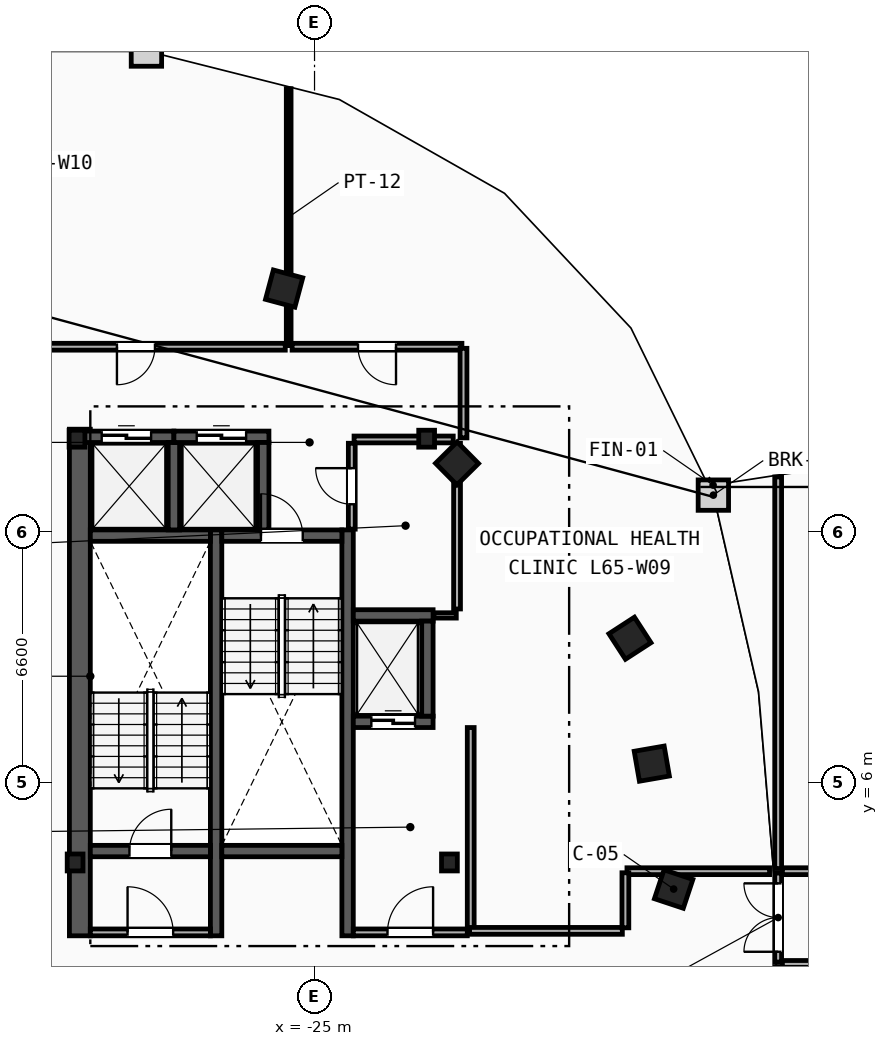
"""IFC4 building model, lengths in metres.
Left out: names, types, materials, properties, quantities, classifications, styles, units other than length and angle.
Written with IfcOpenShell. Run it as: python <this file> out.ifc"""

import sys

from ifc_helpers import new_model, si_unit, direction, frame, frame_2d, origin, origin_2d, place, context, subcontext, project, spatial, rectangle, i_section, extrude, element, fill, save


model = new_model("IFC4")
c1 = context("Model", 3, precision=1e-05, world=origin(), true_north=direction((0.0, 1.0)))
c2 = subcontext(c1, "Body", "Model", "MODEL_VIEW")
j1 = project(units=[si_unit("LENGTHUNIT", "METRE"), si_unit("PLANEANGLEUNIT", "RADIAN")], contexts=[c1])
p1 = place(None, origin())
s1 = spatial("IfcSite", under=j1, at=p1, CompositionType="ELEMENT")
p2 = place(p1, origin())
s2 = spatial("IfcBuilding", under=s1, at=p2, CompositionType="ELEMENT")
p3 = place(p2, frame((0.0, 0.0, 246.8)))
s3 = spatial("IfcBuildingStorey", under=s2, at=p3, CompositionType="ELEMENT", Elevation=246.8)
for number, where, z_axis, x_axis in (
    (1, (-31.3, 3.9, 0.0), (0.0, 0.0, 1.0), (1.0, 0.0, 0.0)),
    (2, (-21.45, 3.9, 0.0), (0.0, 0.0, 1.0), (1.0, 0.0, 0.0)),
    (3, (-22.05, 15.05, 0.0), (0.0, 0.0, 1.0), (1.0, 0.0, 0.0)),
    (4, (-31.25, 15.05, 0.0), (0.0, 0.0, 1.0), (1.0, 0.0, 0.0)),
):
    element("IfcColumn", number, at=place(p3, frame(where, z_axis=z_axis, x_axis=x_axis)), inside=s3, PredefinedType="COLUMN", context=c2, shape_type="SweptSolid", body=[
        extrude(i_section(OverallWidth=0.416, OverallDepth=0.446, WebThickness=0.039, FlangeThickness=0.063, FilletRadius=0.018, at=origin_2d()), origin(), (0.0, 0.0, 1.0), 3.6),
    ])
for number, where, z_axis, x_axis in (
    (5, (-15.55, 3.2, 0.0), (0.0, 0.0, 1.0), (0.315, 0.949, 0.0)),
    (6, (-16.125, 6.5, 0.0), (0.0, 0.0, 1.0), (-0.172, 0.985, 0.0)),
    (7, (-16.7, 9.8, 0.0), (0.0, 0.0, 1.0), (-0.544, 0.839, 0.0)),
    (8, (-21.25, 14.4, 0.0), (0.0, 0.0, 1.0), (-0.703, 0.711, 0.0)),
    (9, (-25.8, 19.0, 0.0), (0.0, 0.0, 1.0), (-0.966, 0.259, 0.0)),
):
    element("IfcColumn", number, at=place(p3, frame(where, z_axis=z_axis, x_axis=x_axis)), inside=s3, PredefinedType="COLUMN", context=c2, shape_type="SweptSolid", body=[
        extrude(rectangle(XDim=0.8, YDim=0.8, at=origin_2d()), origin(), (0.0, 0.0, 1.0), 3.6),
    ])
p4 = place(p3, frame((-31.175, 1.97, 0.0), z_axis=(0.0, 0.0, 1.0), x_axis=(0.0, 1.0, 0.0)))
e10 = element("IfcWall", 10, at=p4, inside=s3, PredefinedType="SHEAR", context=c2, shape_type="SweptSolid", body=[
    extrude(rectangle(XDim=13.33, YDim=0.55, at=frame_2d((6.665, 0.0))), origin(), (0.0, 0.0, 1.0), 3.34),
])
for number, where, z_axis, x_axis in (
    (11, (-27.59, 1.97, 0.0), (0.0, 0.0, 1.0), (0.0, 1.0, 0.0)),
    (12, (-24.13, 1.97, 0.0), (0.0, 0.0, 1.0), (0.0, 1.0, 0.0)),
):
    element("IfcWall", number, at=place(p3, frame(where, z_axis=z_axis, x_axis=x_axis)), inside=s3, PredefinedType="SHEAR", context=c2, shape_type="SweptSolid", body=[
        extrude(rectangle(XDim=10.68, YDim=0.3, at=frame_2d((5.34, 0.0))), origin(), (0.0, 0.0, 1.0), 3.34),
    ])
p5 = place(p3, frame((-30.9, 4.2, 0.0), z_axis=(0.0, 0.0, 1.0), x_axis=(1.0, 0.0, 0.0)))
e13 = element("IfcWall", 13, at=p5, inside=s3, PredefinedType="SHEAR", context=c2, shape_type="SweptSolid", body=[
    extrude(rectangle(XDim=3.16, YDim=0.3, at=frame_2d((1.58, 0.0))), origin(), (0.0, 0.0, 1.0), 3.34),
])
p6 = place(p5, frame((1.03, 0.0, 0.0)))
e14 = element("IfcOpeningElement", 14, at=p6, cuts=e13, PredefinedType="OPENING", context=c2, shape_type="SweptSolid", body=[
    extrude(rectangle(XDim=1.1, YDim=2.15, at=frame_2d((0.55, 1.075))), frame((0.0, 0.16, 0.0), z_axis=(0.0, -1.0, 0.0), x_axis=(1.0, 0.0, 0.0)), (0.0, 0.0, 1.0), 0.32),
])
p7 = place(p3, frame((-30.9, 12.5, 0.0), z_axis=(0.0, 0.0, 1.0), x_axis=(1.0, 0.0, 0.0)))
e15 = element("IfcWall", 15, at=p7, inside=s3, PredefinedType="SHEAR", context=c2, shape_type="SweptSolid", body=[
    extrude(rectangle(XDim=3.16, YDim=0.3, at=frame_2d((1.58, 0.0))), origin(), (0.0, 0.0, 1.0), 3.34),
])
p8 = place(p3, frame((-27.44, 12.5, 0.0), z_axis=(0.0, 0.0, 1.0), x_axis=(1.0, 0.0, 0.0)))
e16 = element("IfcWall", 16, at=p8, inside=s3, PredefinedType="SHEAR", context=c2, shape_type="SweptSolid", body=[
    extrude(rectangle(XDim=3.16, YDim=0.3, at=frame_2d((1.58, 0.0))), origin(), (0.0, 0.0, 1.0), 3.34),
])
p9 = place(p8, frame((1.03, 0.0, 0.0)))
e17 = element("IfcOpeningElement", 17, at=p9, cuts=e16, PredefinedType="OPENING", context=c2, shape_type="SweptSolid", body=[
    extrude(rectangle(XDim=1.1, YDim=2.15, at=frame_2d((0.55, 1.075))), frame((0.0, 0.16, 0.0), z_axis=(0.0, -1.0, 0.0), x_axis=(1.0, 0.0, 0.0)), (0.0, 0.0, 1.0), 0.32),
])
p10 = place(p3, frame((-27.44, 4.2, 0.0), z_axis=(0.0, 0.0, 1.0), x_axis=(1.0, 0.0, 0.0)))
e18 = element("IfcWall", 18, at=p10, inside=s3, PredefinedType="SHEAR", context=c2, shape_type="SweptSolid", body=[
    extrude(rectangle(XDim=3.16, YDim=0.3, at=frame_2d((1.58, 0.0))), origin(), (0.0, 0.0, 1.0), 3.34),
])
p11 = place(p3, frame((-20.89, 2.15, 0.0), z_axis=(0.0, 0.0, 1.0), x_axis=(0.0, 1.0, 0.0)))
e19 = element("IfcWall", 19, at=p11, inside=s3, PredefinedType="PARTITIONING", context=c2, shape_type="SweptSolid", body=[
    extrude(rectangle(XDim=5.3, YDim=0.18, at=frame_2d((2.65, 0.0))), origin(), (0.0, 0.0, 1.0), 3.34),
])
p12 = place(p3, frame((-23.98, 2.06, 0.0), z_axis=(0.0, 0.0, 1.0), x_axis=(1.0, 0.0, 0.0)))
e20 = element("IfcWall", 20, at=p12, inside=s3, PredefinedType="PARTITIONING", context=c2, shape_type="SweptSolid", body=[
    extrude(rectangle(XDim=3.0, YDim=0.18, at=frame_2d((1.5, 0.0))), origin(), (0.0, 0.0, 1.0), 3.34),
])
p13 = place(p12, frame((0.9, 0.0, 0.0)))
e21 = element("IfcOpeningElement", 21, at=p13, cuts=e20, PredefinedType="OPENING", context=c2, shape_type="SweptSolid", body=[
    extrude(rectangle(XDim=1.2, YDim=2.15, at=frame_2d((0.6, 1.075))), frame((0.0, 0.1, 0.0), z_axis=(0.0, -1.0, 0.0), x_axis=(1.0, 0.0, 0.0)), (0.0, 0.0, 1.0), 0.2),
])
p14 = place(p3, frame((-30.9, 2.06, 0.0), z_axis=(0.0, 0.0, 1.0), x_axis=(1.0, 0.0, 0.0)))
e22 = element("IfcWall", 22, at=p14, inside=s3, PredefinedType="PARTITIONING", context=c2, shape_type="SweptSolid", body=[
    extrude(rectangle(XDim=3.16, YDim=0.18, at=frame_2d((1.58, 0.0))), origin(), (0.0, 0.0, 1.0), 3.34),
])
p15 = place(p14, frame((0.98, 0.0, 0.0)))
e23 = element("IfcOpeningElement", 23, at=p15, cuts=e22, PredefinedType="OPENING", context=c2, shape_type="SweptSolid", body=[
    extrude(rectangle(XDim=1.2, YDim=2.15, at=frame_2d((0.6, 1.075))), frame((0.0, 0.1, 0.0), z_axis=(0.0, -1.0, 0.0), x_axis=(1.0, 0.0, 0.0)), (0.0, 0.0, 1.0), 0.2),
])
p16 = place(p3, frame((-23.98, 7.6, 0.0), z_axis=(0.0, 0.0, 1.0), x_axis=(1.0, 0.0, 0.0)))
e24 = element("IfcWall", 24, at=p16, inside=s3, PredefinedType="SHEAR", context=c2, shape_type="SweptSolid", body=[
    extrude(rectangle(XDim=2.1, YDim=0.3, at=frame_2d((1.05, 0.0))), origin(), (0.0, 0.0, 1.0), 3.34),
])
p17 = place(p16, frame((0.475, 0.0, 0.0)))
e25 = element("IfcOpeningElement", 25, at=p17, cuts=e24, PredefinedType="OPENING", context=c2, shape_type="SweptSolid", body=[
    extrude(rectangle(XDim=1.15, YDim=2.2, at=frame_2d((0.575, 1.1))), frame((0.0, 0.16, 0.0), z_axis=(0.0, -1.0, 0.0), x_axis=(1.0, 0.0, 0.0)), (0.0, 0.0, 1.0), 0.32),
])
p18 = place(p3, frame((-23.98, 10.4, 0.0), z_axis=(0.0, 0.0, 1.0), x_axis=(1.0, 0.0, 0.0)))
e26 = element("IfcWall", 26, at=p18, inside=s3, PredefinedType="SHEAR", context=c2, shape_type="SweptSolid", body=[
    extrude(rectangle(XDim=2.1, YDim=0.3, at=frame_2d((1.05, 0.0))), origin(), (0.0, 0.0, 1.0), 3.34),
])
p19 = place(p3, frame((-22.03, 7.75, 0.0), z_axis=(0.0, 0.0, 1.0), x_axis=(0.0, 1.0, 0.0)))
e27 = element("IfcWall", 27, at=p19, inside=s3, PredefinedType="SHEAR", context=c2, shape_type="SweptSolid", body=[
    extrude(rectangle(XDim=2.5, YDim=0.3, at=frame_2d((1.25, 0.0))), origin(), (0.0, 0.0, 1.0), 3.34),
])
p20 = place(p3, frame((-31.2, 15.1, 0.0), z_axis=(0.0, 0.0, 1.0), x_axis=(1.0, 0.0, 0.0)))
e28 = element("IfcWall", 28, at=p20, inside=s3, PredefinedType="SHEAR", context=c2, shape_type="SweptSolid", body=[
    extrude(rectangle(XDim=2.5, YDim=0.3, at=frame_2d((1.25, 0.0))), origin(), (0.0, 0.0, 1.0), 3.34),
])
p21 = place(p20, frame((0.6, 0.0, 0.0)))
e29 = element("IfcOpeningElement", 29, at=p21, cuts=e28, PredefinedType="OPENING", context=c2, shape_type="SweptSolid", body=[
    extrude(rectangle(XDim=1.3, YDim=2.2, at=frame_2d((0.65, 1.1))), frame((0.0, 0.16, 0.0), z_axis=(0.0, -1.0, 0.0), x_axis=(1.0, 0.0, 0.0)), (0.0, 0.0, 1.0), 0.32),
])
p22 = place(p3, frame((-28.7, 12.65, 0.0), z_axis=(0.0, 0.0, 1.0), x_axis=(0.0, 1.0, 0.0)))
e30 = element("IfcWall", 30, at=p22, inside=s3, PredefinedType="SHEAR", context=c2, shape_type="SweptSolid", body=[
    extrude(rectangle(XDim=2.3, YDim=0.3, at=frame_2d((1.15, 0.0))), origin(), (0.0, 0.0, 1.0), 3.34),
])
p23 = place(p3, frame((-28.7, 15.1, 0.0), z_axis=(0.0, 0.0, 1.0), x_axis=(1.0, 0.0, 0.0)))
e31 = element("IfcWall", 31, at=p23, inside=s3, PredefinedType="SHEAR", context=c2, shape_type="SweptSolid", body=[
    extrude(rectangle(XDim=2.5, YDim=0.3, at=frame_2d((1.25, 0.0))), origin(), (0.0, 0.0, 1.0), 3.34),
])
p24 = place(p23, frame((0.6, 0.0, 0.0)))
e32 = element("IfcOpeningElement", 32, at=p24, cuts=e31, PredefinedType="OPENING", context=c2, shape_type="SweptSolid", body=[
    extrude(rectangle(XDim=1.3, YDim=2.2, at=frame_2d((0.65, 1.1))), frame((0.0, 0.16, 0.0), z_axis=(0.0, -1.0, 0.0), x_axis=(1.0, 0.0, 0.0)), (0.0, 0.0, 1.0), 0.32),
])
p25 = place(p3, frame((-26.35, 12.65, 0.0), z_axis=(0.0, 0.0, 1.0), x_axis=(0.0, 1.0, 0.0)))
e33 = element("IfcWall", 33, at=p25, inside=s3, PredefinedType="SHEAR", context=c2, shape_type="SweptSolid", body=[
    extrude(rectangle(XDim=2.3, YDim=0.3, at=frame_2d((1.15, 0.0))), origin(), (0.0, 0.0, 1.0), 3.34),
])
p26 = place(p3, frame((-21.86, 10.4, 0.0), z_axis=(0.0, 0.0, 1.0), x_axis=(1.0, 0.0, 0.0)))
e34 = element("IfcWall", 34, at=p26, inside=s3, PredefinedType="PARTITIONING", context=c2, shape_type="SweptSolid", body=[
    extrude(rectangle(XDim=0.59, YDim=0.14, at=frame_2d((0.295, 0.0))), origin(), (0.0, 0.0, 1.0), 3.34),
])
p27 = place(p3, frame((-21.25, 10.57, 0.0), z_axis=(0.0, 0.0, 1.0), x_axis=(0.0, 1.0, 0.0)))
e35 = element("IfcWall", 35, at=p27, inside=s3, PredefinedType="PARTITIONING", context=c2, shape_type="SweptSolid", body=[
    extrude(rectangle(XDim=4.36, YDim=0.18, at=frame_2d((2.18, 0.0))), origin(), (0.0, 0.0, 1.0), 3.34),
])
p28 = place(p3, frame((-23.96, 15.03, 0.0), z_axis=(0.0, 0.0, 1.0), x_axis=(1.0, 0.0, 0.0)))
e36 = element("IfcWall", 36, at=p28, inside=s3, PredefinedType="PARTITIONING", context=c2, shape_type="SweptSolid", body=[
    extrude(rectangle(XDim=2.61, YDim=0.18, at=frame_2d((1.305, 0.0))), origin(), (0.0, 0.0, 1.0), 2.413),
])
p29 = place(p3, frame((-24.02, 12.67, 0.0), z_axis=(0.0, 0.0, 1.0), x_axis=(0.0, 1.0, 0.0)))
e37 = element("IfcWall", 37, at=p29, inside=s3, PredefinedType="PARTITIONING", context=c2, shape_type="SweptSolid", body=[
    extrude(rectangle(XDim=2.26, YDim=0.18, at=frame_2d((1.13, 0.0))), origin(), (0.0, 0.0, 1.0), 3.34),
])
p30 = place(p29, frame((0.655, 0.0, 0.0)))
e38 = element("IfcOpeningElement", 38, at=p30, cuts=e37, PredefinedType="OPENING", context=c2, shape_type="SweptSolid", body=[
    extrude(rectangle(XDim=0.95, YDim=2.1, at=frame_2d((0.475, 1.05))), frame((0.0, 0.1, 0.0), z_axis=(0.0, -1.0, 0.0), x_axis=(1.0, 0.0, 0.0)), (0.0, 0.0, 1.0), 0.2),
])
p31 = place(p3, frame((-25.68, 17.5, 0.0), z_axis=(0.0, 0.0, 1.0), x_axis=(0.0, 1.0, 0.0)))
e39 = element("IfcWall", 39, at=p31, inside=s3, PredefinedType="PARTITIONING", context=c2, shape_type="SweptSolid", body=[
    extrude(rectangle(XDim=6.76, YDim=0.125, at=frame_2d((3.38, 0.0))), origin(), (0.0, 0.0, 1.0), 3.34),
])
p32 = place(p3, frame((-21.122, 17.47, 0.0), z_axis=(0.0, 0.0, 1.0), x_axis=(-1.0, 0.0, 0.0)))
e40 = element("IfcWall", 40, at=p32, inside=s3, PredefinedType="PARTITIONING", context=c2, shape_type="SweptSolid", body=[
    extrude(rectangle(XDim=4.469, YDim=0.18, at=frame_2d((2.234, 0.0))), origin(), (0.0, 0.0, 1.0), 3.34),
])
p33 = place(p32, frame((1.734, 0.0, 0.0)))
e41 = element("IfcOpeningElement", 41, at=p33, cuts=e40, PredefinedType="OPENING", context=c2, shape_type="SweptSolid", body=[
    extrude(rectangle(XDim=1.0, YDim=2.15, at=frame_2d((0.5, 1.075))), frame((0.0, 0.1, 0.0), z_axis=(0.0, -1.0, 0.0), x_axis=(1.0, 0.0, 0.0)), (0.0, 0.0, 1.0), 0.2),
])
p34 = place(p3, frame((-16.9, 2.1, 0.0), z_axis=(0.0, 0.0, 1.0), x_axis=(-1.0, 0.0, 0.0)))
e42 = element("IfcWall", 42, at=p34, inside=s3, PredefinedType="PARTITIONING", context=c2, shape_type="SweptSolid", body=[
    extrude(rectangle(XDim=4.02, YDim=0.18, at=frame_2d((2.01, 0.0))), origin(), (0.0, 0.0, 1.0), 3.34),
])
p35 = place(p3, frame((-13.026, 3.67, 0.0), z_axis=(0.0, 0.0, 1.0), x_axis=(-1.0, 0.0, 0.0)))
e43 = element("IfcWall", 43, at=p35, inside=s3, PredefinedType="PARTITIONING", context=c2, shape_type="SweptSolid", body=[
    extrude(rectangle(XDim=3.753, YDim=0.18, at=frame_2d((1.876, 0.0))), origin(), (0.0, 0.0, 1.0), 3.34),
])
p36 = place(p3, frame((-21.08, 15.072, 0.0), z_axis=(0.0, 0.0, 1.0), x_axis=(0.0, 1.0, 0.0)))
e44 = element("IfcWall", 44, at=p36, inside=s3, PredefinedType="PARTITIONING", context=c2, shape_type="SweptSolid", body=[
    extrude(rectangle(XDim=2.357, YDim=0.18, at=frame_2d((1.178, 0.0))), origin(), (0.0, 0.0, 1.0), 3.34),
])
p37 = place(p3, frame((-16.82, 3.628, 0.0), z_axis=(0.0, 0.0, 1.0), x_axis=(0.0, -1.0, 0.0)))
e45 = element("IfcWall", 45, at=p37, inside=s3, PredefinedType="PARTITIONING", context=c2, shape_type="SweptSolid", body=[
    extrude(rectangle(XDim=1.448, YDim=0.18, at=frame_2d((0.724, 0.0))), origin(), (0.0, 0.0, 1.0), 3.34),
])
p38 = place(p3, frame((-25.77, 17.47, 0.0), z_axis=(0.0, 0.0, 1.0), x_axis=(-1.0, 0.0, 0.0)))
e46 = element("IfcWall", 46, at=p38, inside=s3, PredefinedType="PARTITIONING", context=c2, shape_type="SweptSolid", body=[
    extrude(rectangle(XDim=7.858, YDim=0.18, at=frame_2d((3.929, 0.0))), origin(), (0.0, 0.0, 1.0), 3.34),
])
p39 = place(p38, frame((3.429, 0.0, 0.0)))
e47 = element("IfcOpeningElement", 47, at=p39, cuts=e46, PredefinedType="OPENING", context=c2, shape_type="SweptSolid", body=[
    extrude(rectangle(XDim=1.0, YDim=2.15, at=frame_2d((0.5, 1.075))), frame((0.0, 0.1, 0.0), z_axis=(0.0, -1.0, 0.0), x_axis=(1.0, 0.0, 0.0)), (0.0, 0.0, 1.0), 0.2),
])
p40 = place(p3, frame((-12.688, 1.23, 0.0), z_axis=(0.0, 0.0, 1.0), x_axis=(1.0, 0.0, 0.0)))
e48 = element("IfcWall", 48, at=p40, inside=s3, PredefinedType="PARTITIONING", context=c2, shape_type="SweptSolid", body=[
    extrude(rectangle(XDim=12.594, YDim=0.18, at=frame_2d((6.297, 0.0))), origin(), (0.0, 0.0, 1.0), 2.663),
])
p41 = place(p40, frame((5.497, 0.0, 0.0)))
e49 = element("IfcOpeningElement", 49, at=p41, cuts=e48, PredefinedType="OPENING", context=c2, shape_type="SweptSolid", body=[
    extrude(rectangle(XDim=1.6, YDim=2.2, at=frame_2d((0.8, 1.1))), frame((0.0, 0.1, 0.0), z_axis=(0.0, -1.0, 0.0), x_axis=(1.0, 0.0, 0.0)), (0.0, 0.0, 1.0), 0.2),
])
p42 = place(p3, frame((-0.095, 3.67, 0.0), z_axis=(0.0, 0.0, 1.0), x_axis=(-1.0, 0.0, 0.0)))
e50 = element("IfcWall", 50, at=p42, inside=s3, PredefinedType="PARTITIONING", context=c2, shape_type="SweptSolid", body=[
    extrude(rectangle(XDim=12.594, YDim=0.18, at=frame_2d((6.297, 0.0))), origin(), (0.0, 0.0, 1.0), 3.34),
])
p43 = place(p42, frame((5.497, 0.0, 0.0)))
e51 = element("IfcOpeningElement", 51, at=p43, cuts=e50, PredefinedType="OPENING", context=c2, shape_type="SweptSolid", body=[
    extrude(rectangle(XDim=1.6, YDim=2.2, at=frame_2d((0.8, 1.1))), frame((0.0, 0.1, 0.0), z_axis=(0.0, -1.0, 0.0), x_axis=(1.0, 0.0, 0.0)), (0.0, 0.0, 1.0), 0.2),
])
p44 = place(p3, frame((-12.8, -0.285, 0.0), z_axis=(0.0, 0.0, 1.0), x_axis=(0.0, 1.0, 0.0)))
e52 = element("IfcWall", 52, at=p44, inside=s3, PredefinedType="PARTITIONING", context=c2, shape_type="SweptSolid", body=[
    extrude(rectangle(XDim=1.445, YDim=0.18, at=frame_2d((0.722, 0.0))), origin(), (0.0, 0.0, 1.0), 3.34),
])
p45 = place(p3, frame((-12.8, 3.74, 0.0), z_axis=(0.0, 0.0, 1.0), x_axis=(0.0, 1.0, 0.0)))
e53 = element("IfcWall", 53, at=p45, inside=s3, PredefinedType="PARTITIONING", context=c2, shape_type="SweptSolid", body=[
    extrude(rectangle(XDim=10.304, YDim=0.18, at=frame_2d((5.152, 0.0))), origin(), (0.0, 0.0, 1.0), 3.34),
])
p46 = place(p3, frame((-12.8, 1.28, 0.0), z_axis=(0.0, 0.0, 1.0), x_axis=(0.0, 1.0, 0.0)))
e54 = element("IfcWall", 54, at=p46, inside=s3, PredefinedType="PARTITIONING", context=c2, shape_type="SweptSolid", body=[
    extrude(rectangle(XDim=2.34, YDim=0.18, at=frame_2d((1.17, 0.0))), origin(), (0.0, 0.0, 1.0), 3.34),
])
p47 = place(p46, frame((0.27, 0.0, 0.0)))
e55 = element("IfcOpeningElement", 55, at=p47, cuts=e54, PredefinedType="OPENING", context=c2, shape_type="SweptSolid", body=[
    extrude(rectangle(XDim=1.8, YDim=2.25, at=frame_2d((0.9, 1.125))), frame((0.0, 0.1, 0.0), z_axis=(0.0, -1.0, 0.0), x_axis=(1.0, 0.0, 0.0)), (0.0, 0.0, 1.0), 0.2),
])
p48 = place(p6, origin())
e56 = element("IfcDoor", 56, at=p48, inside=s3, OperationType="SINGLE_SWING_RIGHT", PredefinedType="DOOR", context=c2, shape_type="SweptSolid", body=[
    extrude(rectangle(XDim=1.1, YDim=2.15, at=frame_2d((0.55, 1.075))), frame((0.0, 0.025, 0.0), z_axis=(0.0, -1.0, 0.0), x_axis=(1.0, 0.0, 0.0)), (0.0, 0.0, 1.0), 0.05),
])
fill(e14, e56)
p49 = place(p9, origin())
e57 = element("IfcDoor", 57, at=p49, inside=s3, OperationType="SINGLE_SWING_LEFT", PredefinedType="DOOR", context=c2, shape_type="SweptSolid", body=[
    extrude(rectangle(XDim=1.1, YDim=2.15, at=frame_2d((0.55, 1.075))), frame((0.0, 0.025, 0.0), z_axis=(0.0, -1.0, 0.0), x_axis=(1.0, 0.0, 0.0)), (0.0, 0.0, 1.0), 0.05),
])
fill(e17, e57)
p50 = place(p13, origin())
e58 = element("IfcDoor", 58, at=p50, inside=s3, OperationType="SINGLE_SWING_RIGHT", PredefinedType="DOOR", context=c2, shape_type="SweptSolid", body=[
    extrude(rectangle(XDim=1.2, YDim=2.15, at=frame_2d((0.6, 1.075))), frame((0.0, 0.025, 0.0), z_axis=(0.0, -1.0, 0.0), x_axis=(1.0, 0.0, 0.0)), (0.0, 0.0, 1.0), 0.05),
])
fill(e21, e58)
p51 = place(p15, origin())
e59 = element("IfcDoor", 59, at=p51, inside=s3, OperationType="SINGLE_SWING_LEFT", PredefinedType="DOOR", context=c2, shape_type="SweptSolid", body=[
    extrude(rectangle(XDim=1.2, YDim=2.15, at=frame_2d((0.6, 1.075))), frame((0.0, 0.025, 0.0), z_axis=(0.0, -1.0, 0.0), x_axis=(1.0, 0.0, 0.0)), (0.0, 0.0, 1.0), 0.05),
])
fill(e23, e59)
p52 = place(p17, origin())
e60 = element("IfcDoor", 60, at=p52, inside=s3, OperationType="SLIDING_TO_LEFT", PredefinedType="TRAPDOOR", context=c2, shape_type="SweptSolid", body=[
    extrude(rectangle(XDim=1.15, YDim=2.2, at=frame_2d((0.575, 1.1))), frame((0.0, 0.025, 0.0), z_axis=(0.0, -1.0, 0.0), x_axis=(1.0, 0.0, 0.0)), (0.0, 0.0, 1.0), 0.05),
])
fill(e25, e60)
p53 = place(p21, origin())
e61 = element("IfcDoor", 61, at=p53, inside=s3, OperationType="SLIDING_TO_LEFT", PredefinedType="TRAPDOOR", context=c2, shape_type="SweptSolid", body=[
    extrude(rectangle(XDim=1.3, YDim=2.2, at=frame_2d((0.65, 1.1))), frame((0.0, 0.025, 0.0), z_axis=(0.0, -1.0, 0.0), x_axis=(1.0, 0.0, 0.0)), (0.0, 0.0, 1.0), 0.05),
])
fill(e29, e61)
p54 = place(p24, origin())
e62 = element("IfcDoor", 62, at=p54, inside=s3, OperationType="SLIDING_TO_LEFT", PredefinedType="TRAPDOOR", context=c2, shape_type="SweptSolid", body=[
    extrude(rectangle(XDim=1.3, YDim=2.2, at=frame_2d((0.65, 1.1))), frame((0.0, 0.025, 0.0), z_axis=(0.0, -1.0, 0.0), x_axis=(1.0, 0.0, 0.0)), (0.0, 0.0, 1.0), 0.05),
])
fill(e32, e62)
p55 = place(p39, origin())
e63 = element("IfcDoor", 63, at=p55, inside=s3, OperationType="SINGLE_SWING_RIGHT", PredefinedType="DOOR", context=c2, shape_type="SweptSolid", body=[
    extrude(rectangle(XDim=1.0, YDim=2.15, at=frame_2d((0.5, 1.075))), frame((0.0, 0.025, 0.0), z_axis=(0.0, -1.0, 0.0), x_axis=(1.0, 0.0, 0.0)), (0.0, 0.0, 1.0), 0.05),
])
fill(e47, e63)
p56 = place(p33, origin())
e64 = element("IfcDoor", 64, at=p56, inside=s3, OperationType="SINGLE_SWING_LEFT", PredefinedType="DOOR", context=c2, shape_type="SweptSolid", body=[
    extrude(rectangle(XDim=1.0, YDim=2.15, at=frame_2d((0.5, 1.075))), frame((0.0, 0.025, 0.0), z_axis=(0.0, -1.0, 0.0), x_axis=(1.0, 0.0, 0.0)), (0.0, 0.0, 1.0), 0.05),
])
fill(e41, e64)
p57 = place(p47, origin())
e65 = element("IfcDoor", 65, at=p57, inside=s3, OperationType="DOUBLE_DOOR_SINGLE_SWING", PredefinedType="DOOR", context=c2, shape_type="SweptSolid", body=[
    extrude(rectangle(XDim=1.8, YDim=2.25, at=frame_2d((0.9, 1.125))), frame((0.0, 0.025, 0.0), z_axis=(0.0, -1.0, 0.0), x_axis=(1.0, 0.0, 0.0)), (0.0, 0.0, 1.0), 0.05),
])
fill(e55, e65)
p58 = place(p30, origin())
e66 = element("IfcDoor", 66, at=p58, inside=s3, OperationType="SINGLE_SWING_RIGHT", PredefinedType="DOOR", context=c2, shape_type="SweptSolid", body=[
    extrude(rectangle(XDim=0.95, YDim=2.1, at=frame_2d((0.475, 1.05))), frame((0.0, 0.025, 0.0), z_axis=(0.0, -1.0, 0.0), x_axis=(1.0, 0.0, 0.0)), (0.0, 0.0, 1.0), 0.05),
])
fill(e38, e66)
save(model, sys.argv[1])
